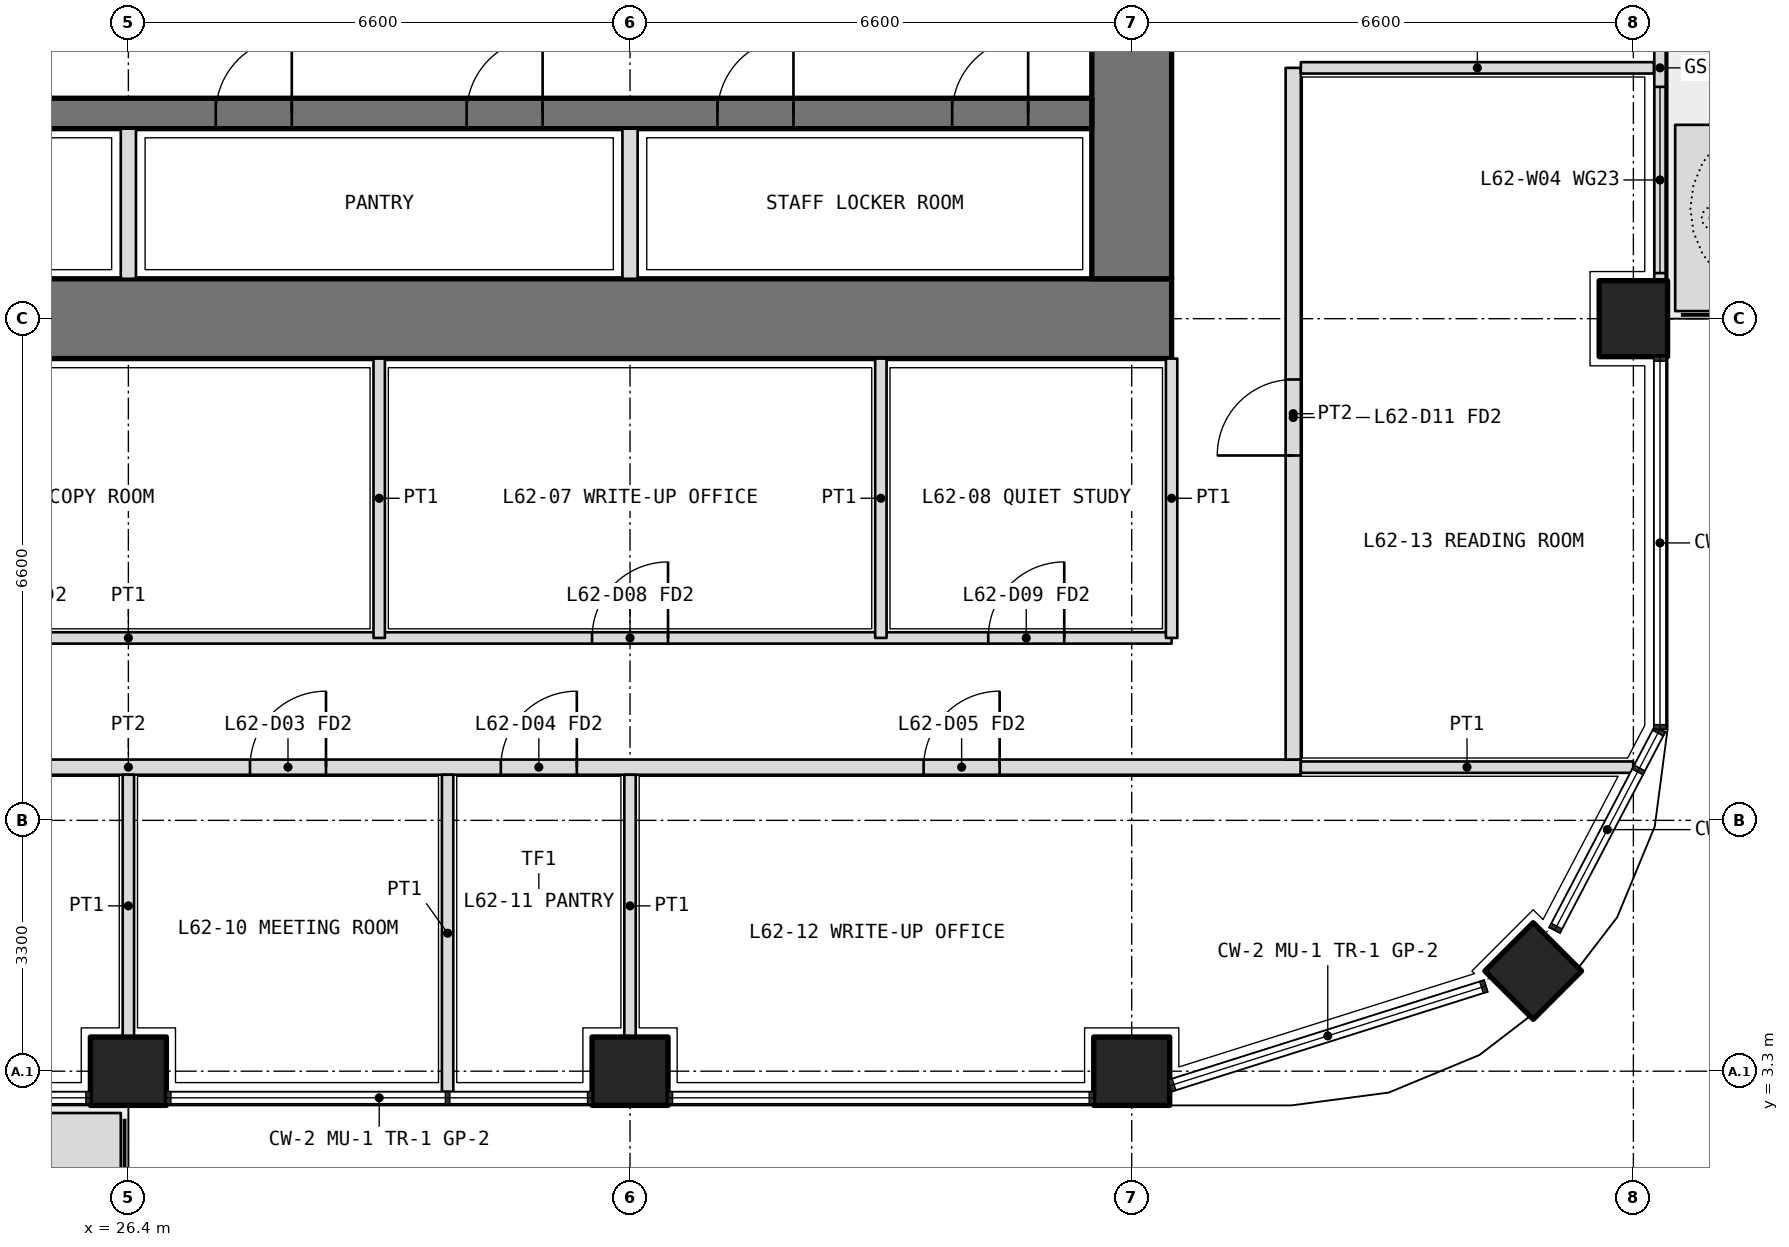
"""IFC4 building model, lengths in metres.
Left out: names, types, materials, properties, quantities, classifications, styles, units other than length and angle.
Written with IfcOpenShell. Run it as: python <this file> out.ifc"""

import sys

from ifc_helpers import new_model, si_unit, direction, frame, frame_2d, origin, origin_2d, place, context, subcontext, project, spatial, polyline, rectangle, outline, extrude, element, fill, save


model = new_model("IFC4")
c1 = context("Model", 3, precision=1e-05, world=origin(), true_north=direction((0.0, 1.0)))
c2 = subcontext(c1, "Body", "Model", "MODEL_VIEW")
j1 = project(units=[si_unit("LENGTHUNIT", "METRE"), si_unit("PLANEANGLEUNIT", "RADIAN")], contexts=[c1])
p1 = place(None, origin())
s1 = spatial("IfcSite", under=j1, at=p1, CompositionType="ELEMENT")
p2 = place(p1, origin())
s2 = spatial("IfcBuilding", under=s1, at=p2, CompositionType="ELEMENT")
p3 = place(p2, frame((0.0, 0.0, 271.2)))
s3 = spatial("IfcBuildingStorey", under=s2, at=p3, CompositionType="ELEMENT", Elevation=271.2)
p4 = place(p3, frame((44.882, 4.618, 0.0), z_axis=(0.0, 0.0, 1.0), x_axis=(0.707106781187, 0.707106781187, 0.0)))
e1 = element("IfcColumn", 1, at=p4, inside=s3, PredefinedType="COLUMN", context=c2, shape_type="SweptSolid", body=[
    extrude(rectangle(XDim=0.9, YDim=0.9, at=origin_2d()), origin(), (0.0, 0.0, 1.0), 4.2),
])
for number, where, z_axis, x_axis in (
    (2, (26.4, 3.3, 0.0), (0.0, 0.0, 1.0), (1.0, 0.0, 0.0)),
    (3, (33.0, 3.3, 0.0), (0.0, 0.0, 1.0), (1.0, 0.0, 0.0)),
    (4, (39.6, 3.3, 0.0), (0.0, 0.0, 1.0), (1.0, 0.0, 0.0)),
    (5, (46.2, 13.2, 0.0), (0.0, 0.0, 1.0), (0.0, 1.0, 0.0)),
):
    element("IfcColumn", number, at=place(p3, frame(where, z_axis=z_axis, x_axis=x_axis)), inside=s3, PredefinedType="COLUMN", context=c2, shape_type="SweptSolid", body=[
        extrude(rectangle(XDim=1.0, YDim=0.9, at=origin_2d()), origin(), (0.0, 0.0, 1.0), 4.2),
    ])
p5 = place(p3, origin())
e6 = element("IfcWall", 6, at=p5, inside=s3, PredefinedType="USERDEFINED", context=c2, shape_type="SweptSolid", body=[
    extrude(outline(polyline([(17.25, 1.75), (26.3, 1.75), (26.3, 2.75), (17.25, 2.75), (17.25, 1.75)]), holes=[polyline([(17.4, 1.9), (26.15, 1.9), (26.15, 2.6), (17.4, 2.6), (17.4, 1.9)])]), origin(), (0.0, 0.0, 1.0), 1.05),
])
p6 = place(p3, origin())
e7 = element("IfcWall", 7, at=p6, inside=s3, PredefinedType="USERDEFINED", context=c2, shape_type="SweptSolid", body=[
    extrude(outline(polyline([(46.75, 13.3), (47.75, 13.3), (47.75, 15.75), (46.75, 15.75), (46.75, 13.3)]), holes=[polyline([(46.9, 13.45), (47.6, 13.45), (47.6, 15.6), (46.9, 15.6), (46.9, 13.45)])]), origin(), (0.0, 0.0, 1.0), 1.05),
])
p7 = place(p3, frame((46.55, 13.7, 0.0), z_axis=(0.0, 0.0, 1.0), x_axis=(0.0, 1.0, 0.0)))
e8 = element("IfcWall", 8, at=p7, inside=s3, PredefinedType="SOLIDWALL", context=c2, shape_type="SweptSolid", body=[
    extrude(rectangle(XDim=5.6, YDim=0.15, at=frame_2d((2.8, 0.0))), origin(), (0.0, 0.0, 1.0), 2.7),
])
p8 = place(p7, frame((3.05, 0.0, 0.0)))
e9 = element("IfcOpeningElement", 9, at=p8, cuts=e8, PredefinedType="OPENING", context=c2, shape_type="SweptSolid", body=[
    extrude(rectangle(XDim=1.0, YDim=2.4, at=frame_2d((0.5, 1.2))), frame((0.0, 0.085, 0.0), z_axis=(0.0, -1.0, 0.0), x_axis=(1.0, 0.0, 0.0)), (0.0, 0.0, 1.0), 0.17),
])
p9 = place(p7, frame((0.1, 0.0, 0.1)))
e10 = element("IfcOpeningElement", 10, at=p9, cuts=e8, PredefinedType="OPENING", context=c2, shape_type="SweptSolid", body=[
    extrude(rectangle(XDim=2.45, YDim=2.3, at=frame_2d((1.225, 1.15))), frame((0.0, 0.085, 0.0), z_axis=(0.0, -1.0, 0.0), x_axis=(1.0, 0.0, 0.0)), (0.0, 0.0, 1.0), 0.17),
])
p10 = place(p7, frame((4.15, 0.0, 0.1)))
e11 = element("IfcOpeningElement", 11, at=p10, cuts=e8, PredefinedType="OPENING", context=c2, shape_type="SweptSolid", body=[
    extrude(rectangle(XDim=1.35, YDim=2.3, at=frame_2d((0.675, 1.15))), frame((0.0, 0.085, 0.0), z_axis=(0.0, -1.0, 0.0), x_axis=(1.0, 0.0, 0.0)), (0.0, 0.0, 1.0), 0.17),
])
p11 = place(p3, frame((12.675, 13.2, 0.0), z_axis=(0.0, 0.0, 1.0), x_axis=(1.0, 0.0, 0.0)))
e12 = element("IfcWall", 12, at=p11, inside=s3, PredefinedType="SHEAR", context=c2, shape_type="SweptSolid", body=[
    extrude(rectangle(XDim=27.45, YDim=1.05, at=frame_2d((13.725, 0.0))), origin(), (0.0, 0.0, 1.0), 4.2),
])
p12 = place(p3, frame((39.6, 13.725, 0.0), z_axis=(0.0, 0.0, 1.0), x_axis=(0.0, 1.0, 0.0)))
e13 = element("IfcWall", 13, at=p12, inside=s3, PredefinedType="SHEAR", context=c2, shape_type="SweptSolid", body=[
    extrude(rectangle(XDim=18.75, YDim=1.05, at=frame_2d((9.375, 0.0))), origin(), (0.0, 0.0, 1.0), 4.2),
])
p13 = place(p12, frame((3.025, 0.0, 0.0)))
e14 = element("IfcOpeningElement", 14, at=p13, cuts=e13, PredefinedType="OPENING", context=c2, shape_type="SweptSolid", body=[
    extrude(rectangle(XDim=1.6, YDim=2.1, at=frame_2d((0.8, 1.05))), frame((0.0, 0.535, 0.0), z_axis=(0.0, -1.0, 0.0), x_axis=(1.0, 0.0, 0.0)), (0.0, 0.0, 1.0), 1.07),
])
p14 = place(p12, frame((13.825, 0.0, 0.0)))
e15 = element("IfcOpeningElement", 15, at=p14, cuts=e13, PredefinedType="OPENING", context=c2, shape_type="SweptSolid", body=[
    extrude(rectangle(XDim=1.6, YDim=2.1, at=frame_2d((0.8, 1.05))), frame((0.0, 0.535, 0.0), z_axis=(0.0, -1.0, 0.0), x_axis=(1.0, 0.0, 0.0)), (0.0, 0.0, 1.0), 1.07),
])
p15 = place(p3, frame((13.725, 15.9, 0.0), z_axis=(0.0, 0.0, 1.0), x_axis=(1.0, 0.0, 0.0)))
e16 = element("IfcWall", 16, at=p15, inside=s3, PredefinedType="SHEAR", context=c2, shape_type="SweptSolid", body=[
    extrude(rectangle(XDim=25.35, YDim=0.4, at=frame_2d((12.675, 0.0))), origin(), (0.0, 0.0, 1.0), 4.2),
])
p16 = place(p15, frame((0.837, 0.0, 0.0)))
e17 = element("IfcOpeningElement", 17, at=p16, cuts=e16, PredefinedType="OPENING", context=c2, shape_type="SweptSolid", body=[
    extrude(rectangle(XDim=1.0, YDim=2.1, at=frame_2d((0.5, 1.05))), frame((0.0, 0.21, 0.0), z_axis=(0.0, -1.0, 0.0), x_axis=(1.0, 0.0, 0.0)), (0.0, 0.0, 1.0), 0.42),
])
p17 = place(p15, frame((3.925, 0.0, 0.0)))
e18 = element("IfcOpeningElement", 18, at=p17, cuts=e16, PredefinedType="OPENING", context=c2, shape_type="SweptSolid", body=[
    extrude(rectangle(XDim=1.0, YDim=2.1, at=frame_2d((0.5, 1.05))), frame((0.0, 0.21, 0.0), z_axis=(0.0, -1.0, 0.0), x_axis=(1.0, 0.0, 0.0)), (0.0, 0.0, 1.0), 0.42),
])
p18 = place(p15, frame((7.225, 0.0, 0.0)))
e19 = element("IfcOpeningElement", 19, at=p18, cuts=e16, PredefinedType="OPENING", context=c2, shape_type="SweptSolid", body=[
    extrude(rectangle(XDim=1.0, YDim=2.1, at=frame_2d((0.5, 1.05))), frame((0.0, 0.21, 0.0), z_axis=(0.0, -1.0, 0.0), x_axis=(1.0, 0.0, 0.0)), (0.0, 0.0, 1.0), 0.42),
])
p19 = place(p15, frame((10.525, 0.0, 0.0)))
e20 = element("IfcOpeningElement", 20, at=p19, cuts=e16, PredefinedType="OPENING", context=c2, shape_type="SweptSolid", body=[
    extrude(rectangle(XDim=1.0, YDim=2.1, at=frame_2d((0.5, 1.05))), frame((0.0, 0.21, 0.0), z_axis=(0.0, -1.0, 0.0), x_axis=(1.0, 0.0, 0.0)), (0.0, 0.0, 1.0), 0.42),
])
p20 = place(p15, frame((13.825, 0.0, 0.0)))
e21 = element("IfcOpeningElement", 21, at=p20, cuts=e16, PredefinedType="OPENING", context=c2, shape_type="SweptSolid", body=[
    extrude(rectangle(XDim=1.0, YDim=2.1, at=frame_2d((0.5, 1.05))), frame((0.0, 0.21, 0.0), z_axis=(0.0, -1.0, 0.0), x_axis=(1.0, 0.0, 0.0)), (0.0, 0.0, 1.0), 0.42),
])
p21 = place(p15, frame((17.125, 0.0, 0.0)))
e22 = element("IfcOpeningElement", 22, at=p21, cuts=e16, PredefinedType="OPENING", context=c2, shape_type="SweptSolid", body=[
    extrude(rectangle(XDim=1.0, YDim=2.1, at=frame_2d((0.5, 1.05))), frame((0.0, 0.21, 0.0), z_axis=(0.0, -1.0, 0.0), x_axis=(1.0, 0.0, 0.0)), (0.0, 0.0, 1.0), 0.42),
])
p22 = place(p15, frame((20.425, 0.0, 0.0)))
e23 = element("IfcOpeningElement", 23, at=p22, cuts=e16, PredefinedType="OPENING", context=c2, shape_type="SweptSolid", body=[
    extrude(rectangle(XDim=1.0, YDim=2.1, at=frame_2d((0.5, 1.05))), frame((0.0, 0.21, 0.0), z_axis=(0.0, -1.0, 0.0), x_axis=(1.0, 0.0, 0.0)), (0.0, 0.0, 1.0), 0.42),
])
p23 = place(p15, frame((23.512, 0.0, 0.0)))
e24 = element("IfcOpeningElement", 24, at=p23, cuts=e16, PredefinedType="OPENING", context=c2, shape_type="SweptSolid", body=[
    extrude(rectangle(XDim=1.0, YDim=2.1, at=frame_2d((0.5, 1.05))), frame((0.0, 0.21, 0.0), z_axis=(0.0, -1.0, 0.0), x_axis=(1.0, 0.0, 0.0)), (0.0, 0.0, 1.0), 0.42),
])
for number, where, z_axis, x_axis in (
    (25, (26.4, 13.725, 0.0), (0.0, 0.0, 1.0), (0.0, 1.0, 0.0)),
    (26, (33.0, 13.725, 0.0), (0.0, 0.0, 1.0), (0.0, 1.0, 0.0)),
):
    element("IfcWall", number, at=place(p3, frame(where, z_axis=z_axis, x_axis=x_axis)), inside=s3, PredefinedType="PARTITIONING", context=c2, shape_type="SweptSolid", body=[
        extrude(rectangle(XDim=1.975, YDim=0.2, at=frame_2d((0.987, 0.0))), origin(), (0.0, 0.0, 1.0), 4.2),
    ])
p24 = place(p3, frame((12.675, 9.0, 0.0), z_axis=(0.0, 0.0, 1.0), x_axis=(1.0, 0.0, 0.0)))
e27 = element("IfcWall", 27, at=p24, inside=s3, PredefinedType="PARTITIONING", context=c2, shape_type="SweptSolid", body=[
    extrude(rectangle(XDim=27.45, YDim=0.15, at=frame_2d((13.725, 0.0))), origin(), (0.0, 0.0, 1.0), 3.0),
])
p25 = place(p24, frame((3.062, 0.0, 0.0)))
e28 = element("IfcOpeningElement", 28, at=p25, cuts=e27, PredefinedType="OPENING", context=c2, shape_type="SweptSolid", body=[
    extrude(rectangle(XDim=1.0, YDim=2.1, at=frame_2d((0.5, 1.05))), frame((0.0, 0.085, 0.0), z_axis=(0.0, -1.0, 0.0), x_axis=(1.0, 0.0, 0.0)), (0.0, 0.0, 1.0), 0.17),
])
p26 = place(p24, frame((11.575, 0.0, 0.0)))
e29 = element("IfcOpeningElement", 29, at=p26, cuts=e27, PredefinedType="OPENING", context=c2, shape_type="SweptSolid", body=[
    extrude(rectangle(XDim=1.0, YDim=2.1, at=frame_2d((0.5, 1.05))), frame((0.0, 0.085, 0.0), z_axis=(0.0, -1.0, 0.0), x_axis=(1.0, 0.0, 0.0)), (0.0, 0.0, 1.0), 0.17),
])
p27 = place(p24, frame((19.825, 0.0, 0.0)))
e30 = element("IfcOpeningElement", 30, at=p27, cuts=e27, PredefinedType="OPENING", context=c2, shape_type="SweptSolid", body=[
    extrude(rectangle(XDim=1.0, YDim=2.1, at=frame_2d((0.5, 1.05))), frame((0.0, 0.085, 0.0), z_axis=(0.0, -1.0, 0.0), x_axis=(1.0, 0.0, 0.0)), (0.0, 0.0, 1.0), 0.17),
])
p28 = place(p24, frame((25.038, 0.0, 0.0)))
e31 = element("IfcOpeningElement", 31, at=p28, cuts=e27, PredefinedType="OPENING", context=c2, shape_type="SweptSolid", body=[
    extrude(rectangle(XDim=1.0, YDim=2.1, at=frame_2d((0.5, 1.05))), frame((0.0, 0.085, 0.0), z_axis=(0.0, -1.0, 0.0), x_axis=(1.0, 0.0, 0.0)), (0.0, 0.0, 1.0), 0.17),
])
p29 = place(p3, frame((40.125, 12.675, 0.0), z_axis=(0.0, 0.0, 1.0), x_axis=(0.0, -1.0, 0.0)))
e32 = element("IfcWall", 32, at=p29, inside=s3, PredefinedType="PARTITIONING", context=c2, shape_type="SweptSolid", body=[
    extrude(rectangle(XDim=3.675, YDim=0.15, at=frame_2d((1.837, 0.0))), origin(), (0.0, 0.0, 1.0), 3.0),
])
for number, where, z_axis, x_axis in (
    (33, (29.7, 12.675, 0.0), (0.0, 0.0, 1.0), (0.0, -1.0, 0.0)),
    (34, (36.3, 12.675, 0.0), (0.0, 0.0, 1.0), (0.0, -1.0, 0.0)),
):
    element("IfcWall", number, at=place(p3, frame(where, z_axis=z_axis, x_axis=x_axis)), inside=s3, PredefinedType="PARTITIONING", context=c2, shape_type="SweptSolid", body=[
        extrude(rectangle(XDim=3.675, YDim=0.15, at=frame_2d((1.837, 0.0))), origin(), (0.0, 0.0, 1.0), 3.9),
    ])
p30 = place(p3, frame((10.975, 7.3, 0.0), z_axis=(0.0, 0.0, 1.0), x_axis=(1.0, 0.0, 0.0)))
e35 = element("IfcWall", 35, at=p30, inside=s3, PredefinedType="PARTITIONING", context=c2, shape_type="SweptSolid", body=[
    extrude(rectangle(XDim=30.85, YDim=0.2, at=frame_2d((15.425, 0.0))), origin(), (0.0, 0.0, 1.0), 3.0),
])
p31 = place(p30, frame((7.262, 0.0, 0.0)))
e36 = element("IfcOpeningElement", 36, at=p31, cuts=e35, PredefinedType="OPENING", context=c2, shape_type="SweptSolid", body=[
    extrude(rectangle(XDim=1.0, YDim=2.1, at=frame_2d((0.5, 1.05))), frame((0.0, 0.11, 0.0), z_axis=(0.0, -1.0, 0.0), x_axis=(1.0, 0.0, 0.0)), (0.0, 0.0, 1.0), 0.22),
])
p32 = place(p30, frame((17.025, 0.0, 0.0)))
e37 = element("IfcOpeningElement", 37, at=p32, cuts=e35, PredefinedType="OPENING", context=c2, shape_type="SweptSolid", body=[
    extrude(rectangle(XDim=1.0, YDim=2.1, at=frame_2d((0.5, 1.05))), frame((0.0, 0.11, 0.0), z_axis=(0.0, -1.0, 0.0), x_axis=(1.0, 0.0, 0.0)), (0.0, 0.0, 1.0), 0.22),
])
p33 = place(p30, frame((20.325, 0.0, 0.0)))
e38 = element("IfcOpeningElement", 38, at=p33, cuts=e35, PredefinedType="OPENING", context=c2, shape_type="SweptSolid", body=[
    extrude(rectangle(XDim=1.0, YDim=2.1, at=frame_2d((0.5, 1.05))), frame((0.0, 0.11, 0.0), z_axis=(0.0, -1.0, 0.0), x_axis=(1.0, 0.0, 0.0)), (0.0, 0.0, 1.0), 0.22),
])
p34 = place(p30, frame((25.887, 0.0, 0.0)))
e39 = element("IfcOpeningElement", 39, at=p34, cuts=e35, PredefinedType="OPENING", context=c2, shape_type="SweptSolid", body=[
    extrude(rectangle(XDim=1.0, YDim=2.1, at=frame_2d((0.5, 1.05))), frame((0.0, 0.11, 0.0), z_axis=(0.0, -1.0, 0.0), x_axis=(1.0, 0.0, 0.0)), (0.0, 0.0, 1.0), 0.22),
])
p35 = place(p3, frame((41.725, 7.4, 0.0), z_axis=(0.0, 0.0, 1.0), x_axis=(0.0, 1.0, 0.0)))
e40 = element("IfcWall", 40, at=p35, inside=s3, PredefinedType="PARTITIONING", context=c2, shape_type="SweptSolid", body=[
    extrude(rectangle(XDim=9.1, YDim=0.2, at=frame_2d((4.55, 0.0))), origin(), (0.0, 0.0, 1.0), 3.0),
])
p36 = place(p35, frame((4.0, 0.0, 0.0)))
e41 = element("IfcOpeningElement", 41, at=p36, cuts=e40, PredefinedType="OPENING", context=c2, shape_type="SweptSolid", body=[
    extrude(rectangle(XDim=1.0, YDim=2.1, at=frame_2d((0.5, 1.05))), frame((0.0, 0.11, 0.0), z_axis=(0.0, -1.0, 0.0), x_axis=(1.0, 0.0, 0.0)), (0.0, 0.0, 1.0), 0.22),
])
p37 = place(p3, frame((46.198, 7.3, 0.0), z_axis=(0.0, 0.0, 1.0), x_axis=(-1.0, 0.0, 0.0)))
e42 = element("IfcWall", 42, at=p37, inside=s3, PredefinedType="PARTITIONING", context=c2, shape_type="SweptSolid", body=[
    extrude(rectangle(XDim=4.373, YDim=0.15, at=frame_2d((2.186, 0.0))), origin(), (0.0, 0.0, 1.0), 2.7),
])
p38 = place(p3, frame((30.6, 3.03, 0.0), z_axis=(0.0, 0.0, 1.0), x_axis=(0.0, 1.0, 0.0)))
e43 = element("IfcWall", 43, at=p38, inside=s3, PredefinedType="PARTITIONING", context=c2, shape_type="SweptSolid", body=[
    extrude(rectangle(XDim=4.17, YDim=0.15, at=frame_2d((2.085, 0.0))), origin(), (0.0, 0.0, 1.0), 2.7),
])
for number, where, z_axis, x_axis in (
    (44, (33.0, 3.75, 0.0), (0.0, 0.0, 1.0), (0.0, 1.0, 0.0)),
    (45, (26.4, 3.75, 0.0), (0.0, 0.0, 1.0), (0.0, 1.0, 0.0)),
):
    element("IfcWall", number, at=place(p3, frame(where, z_axis=z_axis, x_axis=x_axis)), inside=s3, PredefinedType="PARTITIONING", context=c2, shape_type="SweptSolid", body=[
        extrude(rectangle(XDim=3.45, YDim=0.15, at=frame_2d((1.725, 0.0))), origin(), (0.0, 0.0, 1.0), 3.0),
    ])
p39 = place(p3, frame((46.47, 16.5, 0.0), z_axis=(0.0, 0.0, 1.0), x_axis=(-1.0, 0.0, 0.0)))
e46 = element("IfcWall", 46, at=p39, inside=s3, PredefinedType="PARTITIONING", context=c2, shape_type="SweptSolid", body=[
    extrude(rectangle(XDim=4.645, YDim=0.15, at=frame_2d((2.323, 0.0))), origin(), (0.0, 0.0, 1.0), 2.7),
])
p40 = place(p9, origin())
e47 = element("IfcWindow", 47, at=p40, inside=s3, PartitioningType="SINGLE_PANEL", PredefinedType="WINDOW", context=c2, shape_type="SweptSolid", body=[
    extrude(rectangle(XDim=2.45, YDim=2.3, at=frame_2d((1.225, 1.15))), frame((0.0, 0.03, 0.0), z_axis=(0.0, -1.0, 0.0), x_axis=(1.0, 0.0, 0.0)), (0.0, 0.0, 1.0), 0.06),
])
fill(e10, e47)
p41 = place(p27, origin())
e48 = element("IfcDoor", 48, at=p41, inside=s3, OperationType="SINGLE_SWING_RIGHT", PredefinedType="DOOR", context=c2, shape_type="SweptSolid", body=[
    extrude(rectangle(XDim=1.0, YDim=2.1, at=frame_2d((0.5, 1.05))), frame((0.0, 0.025, 0.0), z_axis=(0.0, -1.0, 0.0), x_axis=(1.0, 0.0, 0.0)), (0.0, 0.0, 1.0), 0.05),
])
fill(e30, e48)
p42 = place(p28, origin())
e49 = element("IfcDoor", 49, at=p42, inside=s3, OperationType="SINGLE_SWING_RIGHT", PredefinedType="DOOR", context=c2, shape_type="SweptSolid", body=[
    extrude(rectangle(XDim=1.0, YDim=2.1, at=frame_2d((0.5, 1.05))), frame((0.0, 0.025, 0.0), z_axis=(0.0, -1.0, 0.0), x_axis=(1.0, 0.0, 0.0)), (0.0, 0.0, 1.0), 0.05),
])
fill(e31, e49)
p43 = place(p32, origin())
e50 = element("IfcDoor", 50, at=p43, inside=s3, OperationType="SINGLE_SWING_RIGHT", PredefinedType="DOOR", context=c2, shape_type="SweptSolid", body=[
    extrude(rectangle(XDim=1.0, YDim=2.1, at=frame_2d((0.5, 1.05))), frame((0.0, 0.025, 0.0), z_axis=(0.0, -1.0, 0.0), x_axis=(1.0, 0.0, 0.0)), (0.0, 0.0, 1.0), 0.05),
])
fill(e37, e50)
p44 = place(p33, origin())
e51 = element("IfcDoor", 51, at=p44, inside=s3, OperationType="SINGLE_SWING_RIGHT", PredefinedType="DOOR", context=c2, shape_type="SweptSolid", body=[
    extrude(rectangle(XDim=1.0, YDim=2.1, at=frame_2d((0.5, 1.05))), frame((0.0, 0.025, 0.0), z_axis=(0.0, -1.0, 0.0), x_axis=(1.0, 0.0, 0.0)), (0.0, 0.0, 1.0), 0.05),
])
fill(e38, e51)
p45 = place(p34, origin())
e52 = element("IfcDoor", 52, at=p45, inside=s3, OperationType="SINGLE_SWING_RIGHT", PredefinedType="DOOR", context=c2, shape_type="SweptSolid", body=[
    extrude(rectangle(XDim=1.0, YDim=2.1, at=frame_2d((0.5, 1.05))), frame((0.0, 0.025, 0.0), z_axis=(0.0, -1.0, 0.0), x_axis=(1.0, 0.0, 0.0)), (0.0, 0.0, 1.0), 0.05),
])
fill(e39, e52)
p46 = place(p36, origin())
e53 = element("IfcDoor", 53, at=p46, inside=s3, OperationType="SINGLE_SWING_LEFT", PredefinedType="DOOR", context=c2, shape_type="SweptSolid", body=[
    extrude(rectangle(XDim=1.0, YDim=2.1, at=frame_2d((0.5, 1.05))), frame((0.0, 0.025, 0.0), z_axis=(0.0, -1.0, 0.0), x_axis=(1.0, 0.0, 0.0)), (0.0, 0.0, 1.0), 0.05),
])
fill(e41, e53)
p47 = place(p20, origin())
e54 = element("IfcDoor", 54, at=p47, inside=s3, OperationType="SINGLE_SWING_RIGHT", PredefinedType="DOOR", context=c2, shape_type="SweptSolid", body=[
    extrude(rectangle(XDim=1.0, YDim=2.1, at=frame_2d((0.5, 1.05))), frame((0.0, 0.025, 0.0), z_axis=(0.0, -1.0, 0.0), x_axis=(1.0, 0.0, 0.0)), (0.0, 0.0, 1.0), 0.05),
])
fill(e21, e54)
p48 = place(p21, origin())
e55 = element("IfcDoor", 55, at=p48, inside=s3, OperationType="SINGLE_SWING_RIGHT", PredefinedType="DOOR", context=c2, shape_type="SweptSolid", body=[
    extrude(rectangle(XDim=1.0, YDim=2.1, at=frame_2d((0.5, 1.05))), frame((0.0, 0.025, 0.0), z_axis=(0.0, -1.0, 0.0), x_axis=(1.0, 0.0, 0.0)), (0.0, 0.0, 1.0), 0.05),
])
fill(e22, e55)
p49 = place(p22, origin())
e56 = element("IfcDoor", 56, at=p49, inside=s3, OperationType="SINGLE_SWING_RIGHT", PredefinedType="DOOR", context=c2, shape_type="SweptSolid", body=[
    extrude(rectangle(XDim=1.0, YDim=2.1, at=frame_2d((0.5, 1.05))), frame((0.0, 0.025, 0.0), z_axis=(0.0, -1.0, 0.0), x_axis=(1.0, 0.0, 0.0)), (0.0, 0.0, 1.0), 0.05),
])
fill(e23, e56)
p50 = place(p23, origin())
e57 = element("IfcDoor", 57, at=p50, inside=s3, OperationType="SINGLE_SWING_RIGHT", PredefinedType="DOOR", context=c2, shape_type="SweptSolid", body=[
    extrude(rectangle(XDim=1.0, YDim=2.1, at=frame_2d((0.5, 1.05))), frame((0.0, 0.025, 0.0), z_axis=(0.0, -1.0, 0.0), x_axis=(1.0, 0.0, 0.0)), (0.0, 0.0, 1.0), 0.05),
])
fill(e24, e57)
save(model, sys.argv[1])
